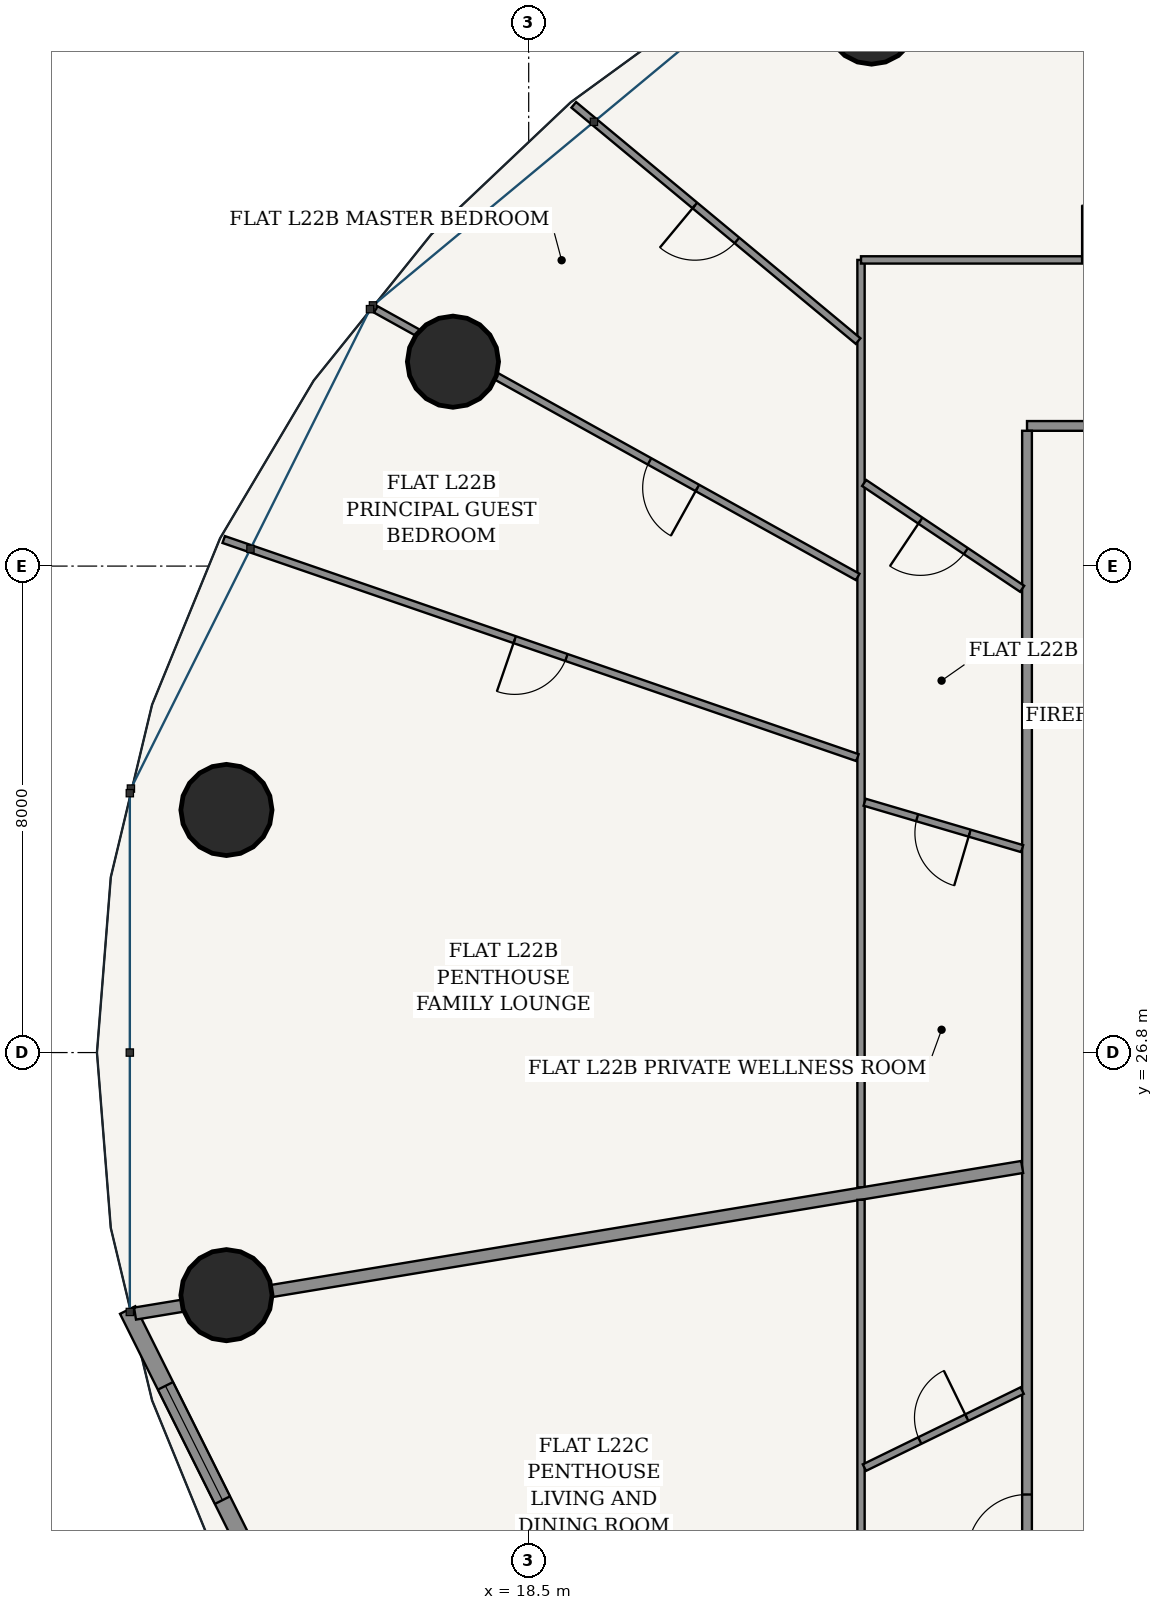
"""IFC4 building model, lengths in metres.
Left out: names, types, materials, properties, quantities, classifications, styles, units other than length and angle.
Written with IfcOpenShell. Run it as: python <this file> out.ifc"""

import sys

from ifc_helpers import new_model, si_unit, direction, frame, frame_2d, origin, origin_2d, place, context, subcontext, project, spatial, rectangle, hollow_circle, extrude, source, transform, mapped, element, fill, save


model = new_model("IFC4")
c1 = context("Model", 3, precision=1e-05, world=origin(), true_north=direction((-0.2419218956, 0.970295726276)))
c2 = subcontext(c1, "Body", "Model", "MODEL_VIEW")
j1 = project(units=[si_unit("LENGTHUNIT", "METRE"), si_unit("PLANEANGLEUNIT", "RADIAN")], contexts=[c1])
p1 = place(None, origin())
s1 = spatial("IfcSite", under=j1, at=p1, CompositionType="ELEMENT")
p2 = place(p1, origin())
s2 = spatial("IfcBuilding", under=s1, at=p2, CompositionType="ELEMENT")
p3 = place(p2, frame((0.0, 0.0, 87.0)))
s3 = spatial("IfcBuildingStorey", under=s2, at=p3, CompositionType="ELEMENT", Elevation=87.0)
for number, where, z_axis, x_axis in (
    (1, (24.138, 43.803, 0.0), (0.0, 0.0, 1.0), (1.0, 0.0, 0.0)),
    (2, (17.255, 38.161, 0.0), (0.0, 0.0, 1.0), (1.0, 0.0, 0.0)),
    (3, (13.529, 30.79, 0.0), (0.0, 0.0, 1.0), (1.0, 0.0, 0.0)),
    (4, (13.529, 22.81, 0.0), (0.0, 0.0, 1.0), (1.0, 0.0, 0.0)),
):
    element("IfcColumn", number, at=place(p3, frame(where, z_axis=z_axis, x_axis=x_axis)), inside=s3, PredefinedType="COLUMN", context=c2, shape_type="SweptSolid", body=[
        extrude(hollow_circle(Radius=0.75, WallThickness=0.045, at=origin_2d()), origin(), (0.0, 0.0, 1.0), 3.6),
    ])
p4 = place(p3, frame((11.905, 22.566, 0.0), z_axis=(0.0, 0.0, 1.0), x_axis=(0.446274562077, -0.894896091869, 0.0)))
e5 = element("IfcWall", 5, at=p4, inside=s3, PredefinedType="SOLIDWALL", context=c2, shape_type="SweptSolid", body=[
    extrude(rectangle(XDim=9.05, YDim=0.28, at=frame_2d((4.525, 0.0))), origin(), (0.0, 0.0, 1.0), 3.325),
])
p5 = place(p4, frame((1.394, 0.0, 0.85)))
e6 = element("IfcOpeningElement", 6, at=p5, cuts=e5, PredefinedType="OPENING", context=c2, shape_type="SweptSolid", body=[
    extrude(rectangle(XDim=2.1, YDim=1.95, at=frame_2d((1.05, 0.975))), frame((0.0, 0.15, 0.0), z_axis=(0.0, -1.0, 0.0), x_axis=(1.0, 0.0, 0.0)), (0.0, 0.0, 1.0), 0.3),
])
p6 = place(p4, frame((5.557, 0.0, 0.85)))
e7 = element("IfcOpeningElement", 7, at=p6, cuts=e5, PredefinedType="OPENING", context=c2, shape_type="SweptSolid", body=[
    extrude(rectangle(XDim=2.1, YDim=1.95, at=frame_2d((1.05, 0.975))), frame((0.0, 0.15, 0.0), z_axis=(0.0, -1.0, 0.0), x_axis=(1.0, 0.0, 0.0)), (0.0, 0.0, 1.0), 0.3),
])
p7 = place(p3, frame((26.695, 37.105, 0.0), z_axis=(0.0, 0.0, 1.0), x_axis=(1.0, 0.0, 0.0)))
e8 = element("IfcWall", 8, at=p7, inside=s3, PredefinedType="PARTITIONING", context=c2, shape_type="SweptSolid", body=[
    extrude(rectangle(XDim=22.61, YDim=0.16, at=frame_2d((11.305, 0.0))), origin(), (0.0, 0.0, 1.0), 2.767),
])
p8 = place(p7, frame((18.812, 0.0, 0.0)))
e9 = element("IfcOpeningElement", 9, at=p8, cuts=e8, PredefinedType="OPENING", context=c2, shape_type="SweptSolid", body=[
    extrude(rectangle(XDim=0.98, YDim=2.2, at=frame_2d((0.49, 1.1))), frame((0.0, 0.09, 0.0), z_axis=(0.0, -1.0, 0.0), x_axis=(1.0, 0.0, 0.0)), (0.0, 0.0, 1.0), 0.18),
])
p9 = place(p7, frame((2.823, 0.0, 0.0)))
e10 = element("IfcOpeningElement", 10, at=p9, cuts=e8, PredefinedType="OPENING", context=c2, shape_type="SweptSolid", body=[
    extrude(rectangle(XDim=0.98, YDim=2.2, at=frame_2d((0.49, 1.1))), frame((0.0, 0.09, 0.0), z_axis=(0.0, -1.0, 0.0), x_axis=(1.0, 0.0, 0.0)), (0.0, 0.0, 1.0), 0.18),
])
p10 = place(p3, frame((26.695, 16.575, 0.0), z_axis=(0.0, 0.0, 1.0), x_axis=(0.0, 1.0, 0.0)))
e11 = element("IfcWall", 11, at=p10, inside=s3, PredefinedType="PARTITIONING", context=c2, shape_type="SweptSolid", body=[
    extrude(rectangle(XDim=20.45, YDim=0.16, at=frame_2d((10.225, 0.0))), origin(), (0.0, 0.0, 1.0), 2.767),
])
p11 = place(p10, frame((1.977, 0.0, 0.0)))
e12 = element("IfcOpeningElement", 12, at=p11, cuts=e11, PredefinedType="OPENING", context=c2, shape_type="SweptSolid", body=[
    extrude(rectangle(XDim=0.98, YDim=2.2, at=frame_2d((0.49, 1.1))), frame((0.0, 0.09, 0.0), z_axis=(0.0, -1.0, 0.0), x_axis=(1.0, 0.0, 0.0)), (0.0, 0.0, 1.0), 0.18),
])
p12 = place(p3, frame((23.965, 24.583, 0.0), z_axis=(0.0, 0.0, 1.0), x_axis=(0.0, 1.0, 0.0)))
e13 = element("IfcWall", 13, at=p12, inside=s3, PredefinedType="PARTITIONING", context=c2, shape_type="SweptSolid", body=[
    extrude(rectangle(XDim=15.252, YDim=0.12, at=frame_2d((7.626, 0.0))), origin(), (0.0, 0.0, 1.0), 2.767),
])
p13 = place(p3, frame((23.965, 39.835, 0.0), z_axis=(0.0, 0.0, 1.0), x_axis=(1.0, 0.0, 0.0)))
e14 = element("IfcWall", 14, at=p13, inside=s3, PredefinedType="PARTITIONING", context=c2, shape_type="SweptSolid", body=[
    extrude(rectangle(XDim=13.933, YDim=0.12, at=frame_2d((6.966, 0.0))), origin(), (0.0, 0.0, 1.0), 2.767),
])
p14 = place(p13, frame((3.636, 0.0, 0.0)))
e15 = element("IfcOpeningElement", 15, at=p14, cuts=e14, PredefinedType="OPENING", context=c2, shape_type="SweptSolid", body=[
    extrude(rectangle(XDim=0.9, YDim=2.15, at=frame_2d((0.45, 1.075))), frame((0.0, 0.07, 0.0), z_axis=(0.0, -1.0, 0.0), x_axis=(1.0, 0.0, 0.0)), (0.0, 0.0, 1.0), 0.14),
])
p15 = place(p3, frame((23.917, 38.5, 0.0), z_axis=(0.0, 0.0, 1.0), x_axis=(-0.769161827891, 0.63905405289, 0.0)))
e16 = element("IfcWall", 16, at=p15, inside=s3, PredefinedType="PARTITIONING", context=c2, shape_type="SweptSolid", body=[
    extrude(rectangle(XDim=6.08, YDim=0.12, at=frame_2d((3.04, 0.0))), origin(), (0.0, 0.0, 1.0), 2.767),
])
p16 = place(p15, frame((2.59, 0.0, 0.0)))
e17 = element("IfcOpeningElement", 17, at=p16, cuts=e16, PredefinedType="OPENING", context=c2, shape_type="SweptSolid", body=[
    extrude(rectangle(XDim=0.9, YDim=2.15, at=frame_2d((0.45, 1.075))), frame((0.0, 0.07, 0.0), z_axis=(0.0, -1.0, 0.0), x_axis=(1.0, 0.0, 0.0)), (0.0, 0.0, 1.0), 0.14),
])
p17 = place(p3, frame((23.911, 34.622, 0.0), z_axis=(0.0, 0.0, 1.0), x_axis=(-0.874324904351, 0.485341077626, 0.0)))
e18 = element("IfcWall", 18, at=p17, inside=s3, PredefinedType="PARTITIONING", context=c2, shape_type="SweptSolid", body=[
    extrude(rectangle(XDim=9.066, YDim=0.12, at=frame_2d((4.533, 0.0))), origin(), (0.0, 0.0, 1.0), 2.767),
])
p18 = place(p17, frame((3.016, 0.0, 0.0)))
e19 = element("IfcOpeningElement", 19, at=p18, cuts=e18, PredefinedType="OPENING", context=c2, shape_type="SweptSolid", body=[
    extrude(rectangle(XDim=0.9, YDim=2.15, at=frame_2d((0.45, 1.075))), frame((0.0, 0.07, 0.0), z_axis=(0.0, -1.0, 0.0), x_axis=(1.0, 0.0, 0.0)), (0.0, 0.0, 1.0), 0.14),
])
p19 = place(p3, frame((23.906, 31.65, 0.0), z_axis=(0.0, 0.0, 1.0), x_axis=(-0.945573120726, 0.32540970078, 0.0)))
e20 = element("IfcWall", 20, at=p19, inside=s3, PredefinedType="PARTITIONING", context=c2, shape_type="SweptSolid", body=[
    extrude(rectangle(XDim=11.022, YDim=0.12, at=frame_2d((5.511, 0.0))), origin(), (0.0, 0.0, 1.0), 2.767),
])
p20 = place(p19, frame((5.061, 0.0, 0.0)))
e21 = element("IfcOpeningElement", 21, at=p20, cuts=e20, PredefinedType="OPENING", context=c2, shape_type="SweptSolid", body=[
    extrude(rectangle(XDim=0.9, YDim=2.15, at=frame_2d((0.45, 1.075))), frame((0.0, 0.07, 0.0), z_axis=(0.0, -1.0, 0.0), x_axis=(1.0, 0.0, 0.0)), (0.0, 0.0, 1.0), 0.14),
])
p21 = place(p3, frame((26.615, 34.427, 0.0), z_axis=(0.0, 0.0, 1.0), x_axis=(-0.830799215213, 0.556572245088, 0.0)))
e22 = element("IfcWall", 22, at=p21, inside=s3, PredefinedType="PARTITIONING", context=c2, shape_type="SweptSolid", body=[
    extrude(rectangle(XDim=3.128, YDim=0.12, at=frame_2d((1.564, 0.0))), origin(), (0.0, 0.0, 1.0), 3.004),
])
p22 = place(p21, frame((1.114, 0.0, 0.0)))
e23 = element("IfcOpeningElement", 23, at=p22, cuts=e22, PredefinedType="OPENING", context=c2, shape_type="SweptSolid", body=[
    extrude(rectangle(XDim=0.9, YDim=2.15, at=frame_2d((0.45, 1.075))), frame((0.0, 0.07, 0.0), z_axis=(0.0, -1.0, 0.0), x_axis=(1.0, 0.0, 0.0)), (0.0, 0.0, 1.0), 0.14),
])
p23 = place(p3, frame((26.615, 30.154, 0.0), z_axis=(0.0, 0.0, 1.0), x_axis=(-0.959264672883, 0.282508915537, 0.0)))
e24 = element("IfcWall", 24, at=p23, inside=s3, PredefinedType="PARTITIONING", context=c2, shape_type="SweptSolid", body=[
    extrude(rectangle(XDim=2.701, YDim=0.12, at=frame_2d((1.35, 0.0))), origin(), (0.0, 0.0, 1.0), 3.325),
])
p24 = place(p23, frame((0.9, 0.0, 0.0)))
e25 = element("IfcOpeningElement", 25, at=p24, cuts=e24, PredefinedType="OPENING", context=c2, shape_type="SweptSolid", body=[
    extrude(rectangle(XDim=0.9, YDim=2.15, at=frame_2d((0.45, 1.075))), frame((0.0, 0.07, 0.0), z_axis=(0.0, -1.0, 0.0), x_axis=(1.0, 0.0, 0.0)), (0.0, 0.0, 1.0), 0.14),
])
p25 = place(p3, frame((26.615, 24.918, 0.0), z_axis=(0.0, 0.0, 1.0), x_axis=(-0.986618789677, -0.163044054958, 0.0)))
e26 = element("IfcWall", 26, at=p25, inside=s3, PredefinedType="PARTITIONING", context=c2, shape_type="SweptSolid", body=[
    extrude(rectangle(XDim=14.787, YDim=0.2, at=frame_2d((7.393, 0.0))), origin(), (0.0, 0.0, 1.0), 2.767),
])
p26 = place(p3, frame((23.965, 13.765, 0.0), z_axis=(0.0, 0.0, 1.0), x_axis=(0.0, 1.0, 0.0)))
e27 = element("IfcWall", 27, at=p26, inside=s3, PredefinedType="PARTITIONING", context=c2, shape_type="SweptSolid", body=[
    extrude(rectangle(XDim=10.614, YDim=0.12, at=frame_2d((5.307, 0.0))), origin(), (0.0, 0.0, 1.0), 2.767),
])
p27 = place(p26, frame((2.815, 0.0, 0.0)))
e28 = element("IfcOpeningElement", 28, at=p27, cuts=e27, PredefinedType="OPENING", context=c2, shape_type="SweptSolid", body=[
    extrude(rectangle(XDim=0.9, YDim=2.15, at=frame_2d((0.45, 1.075))), frame((0.0, 0.07, 0.0), z_axis=(0.0, -1.0, 0.0), x_axis=(1.0, 0.0, 0.0)), (0.0, 0.0, 1.0), 0.14),
])
p28 = place(p3, frame((26.615, 21.241, 0.0), z_axis=(0.0, 0.0, 1.0), x_axis=(-0.898615592274, -0.438736842906, 0.0)))
e29 = element("IfcWall", 29, at=p28, inside=s3, PredefinedType="PARTITIONING", context=c2, shape_type="SweptSolid", body=[
    extrude(rectangle(XDim=2.887, YDim=0.12, at=frame_2d((1.443, 0.0))), origin(), (0.0, 0.0, 1.0), 3.325),
])
p29 = place(p28, frame((1.013, 0.0, 0.0)))
e30 = element("IfcOpeningElement", 30, at=p29, cuts=e29, PredefinedType="OPENING", context=c2, shape_type="SweptSolid", body=[
    extrude(rectangle(XDim=0.86, YDim=2.15, at=frame_2d((0.43, 1.075))), frame((0.0, 0.07, 0.0), z_axis=(0.0, -1.0, 0.0), x_axis=(1.0, 0.0, 0.0)), (0.0, 0.0, 1.0), 0.14),
])
m1 = source(origin(), c2, "Body", "SweptSolid", [
    extrude(rectangle(XDim=2.1, YDim=1.95, at=frame_2d((1.05, 0.975))), frame((0.0, 0.03, 0.0), z_axis=(0.0, -1.0, 0.0), x_axis=(1.0, 0.0, 0.0)), (0.0, 0.0, 1.0), 0.06),
])
p30 = place(p5, origin())
e31 = element("IfcWindow", 31, at=p30, inside=s3, PartitioningType="SINGLE_PANEL", PredefinedType="WINDOW", context=c2, shape_type="MappedRepresentation", body=[
    mapped(m1, transform((0.0, 0.0, 0.0), scale=1.0)),
])
fill(e6, e31)
m2 = source(origin(), c2, "Body", "SweptSolid", [
    extrude(rectangle(XDim=0.9, YDim=2.15, at=frame_2d((0.45, 1.075))), frame((0.0, 0.025, 0.0), z_axis=(0.0, -1.0, 0.0), x_axis=(1.0, 0.0, 0.0)), (0.0, 0.0, 1.0), 0.05),
])
p31 = place(p14, origin())
e32 = element("IfcDoor", 32, at=p31, inside=s3, OperationType="SINGLE_SWING_LEFT", PredefinedType="DOOR", context=c2, shape_type="MappedRepresentation", body=[
    mapped(m2, transform((0.0, 0.0, 0.0), scale=1.0)),
])
fill(e15, e32)
p32 = place(p22, origin())
e33 = element("IfcDoor", 33, at=p32, inside=s3, OperationType="SINGLE_SWING_RIGHT", PredefinedType="DOOR", context=c2, shape_type="MappedRepresentation", body=[
    mapped(m2, transform((0.0, 0.0, 0.0), scale=1.0)),
])
fill(e23, e33)
p33 = place(p24, origin())
e34 = element("IfcDoor", 34, at=p33, inside=s3, OperationType="SINGLE_SWING_LEFT", PredefinedType="DOOR", context=c2, shape_type="MappedRepresentation", body=[
    mapped(m2, transform((0.0, 0.0, 0.0), scale=1.0)),
])
fill(e25, e34)
p34 = place(p16, origin())
e35 = element("IfcDoor", 35, at=p34, inside=s3, OperationType="SINGLE_SWING_RIGHT", PredefinedType="DOOR", context=c2, shape_type="MappedRepresentation", body=[
    mapped(m2, transform((0.0, 0.0, 0.0), scale=1.0)),
])
fill(e17, e35)
p35 = place(p18, origin())
e36 = element("IfcDoor", 36, at=p35, inside=s3, OperationType="SINGLE_SWING_LEFT", PredefinedType="DOOR", context=c2, shape_type="MappedRepresentation", body=[
    mapped(m2, transform((0.0, 0.0, 0.0), scale=1.0)),
])
fill(e19, e36)
p36 = place(p20, origin())
e37 = element("IfcDoor", 37, at=p36, inside=s3, OperationType="SINGLE_SWING_RIGHT", PredefinedType="DOOR", context=c2, shape_type="MappedRepresentation", body=[
    mapped(m2, transform((0.0, 0.0, 0.0), scale=1.0)),
])
fill(e21, e37)
m3 = source(origin(), c2, "Body", "SweptSolid", [
    extrude(rectangle(XDim=0.98, YDim=2.2, at=frame_2d((0.49, 1.1))), frame((0.0, 0.025, 0.0), z_axis=(0.0, -1.0, 0.0), x_axis=(1.0, 0.0, 0.0)), (0.0, 0.0, 1.0), 0.05),
])
p37 = place(p11, origin())
e38 = element("IfcDoor", 38, at=p37, inside=s3, OperationType="SINGLE_SWING_LEFT", PredefinedType="DOOR", context=c2, shape_type="MappedRepresentation", body=[
    mapped(m3, transform((0.0, 0.0, 0.0), scale=1.0)),
])
fill(e12, e38)
m4 = source(origin(), c2, "Body", "SweptSolid", [
    extrude(rectangle(XDim=0.86, YDim=2.15, at=frame_2d((0.43, 1.075))), frame((0.0, 0.025, 0.0), z_axis=(0.0, -1.0, 0.0), x_axis=(1.0, 0.0, 0.0)), (0.0, 0.0, 1.0), 0.05),
])
p38 = place(p29, frame((0.86, 0.0, 0.0), z_axis=(0.0, 0.0, 1.0), x_axis=(-1.0, 0.0, 0.0)))
e39 = element("IfcDoor", 39, at=p38, inside=s3, OperationType="SINGLE_SWING_RIGHT", PredefinedType="DOOR", context=c2, shape_type="MappedRepresentation", body=[
    mapped(m4, transform((0.0, 0.0, 0.0), scale=1.0)),
])
fill(e30, e39)
save(model, sys.argv[1])
